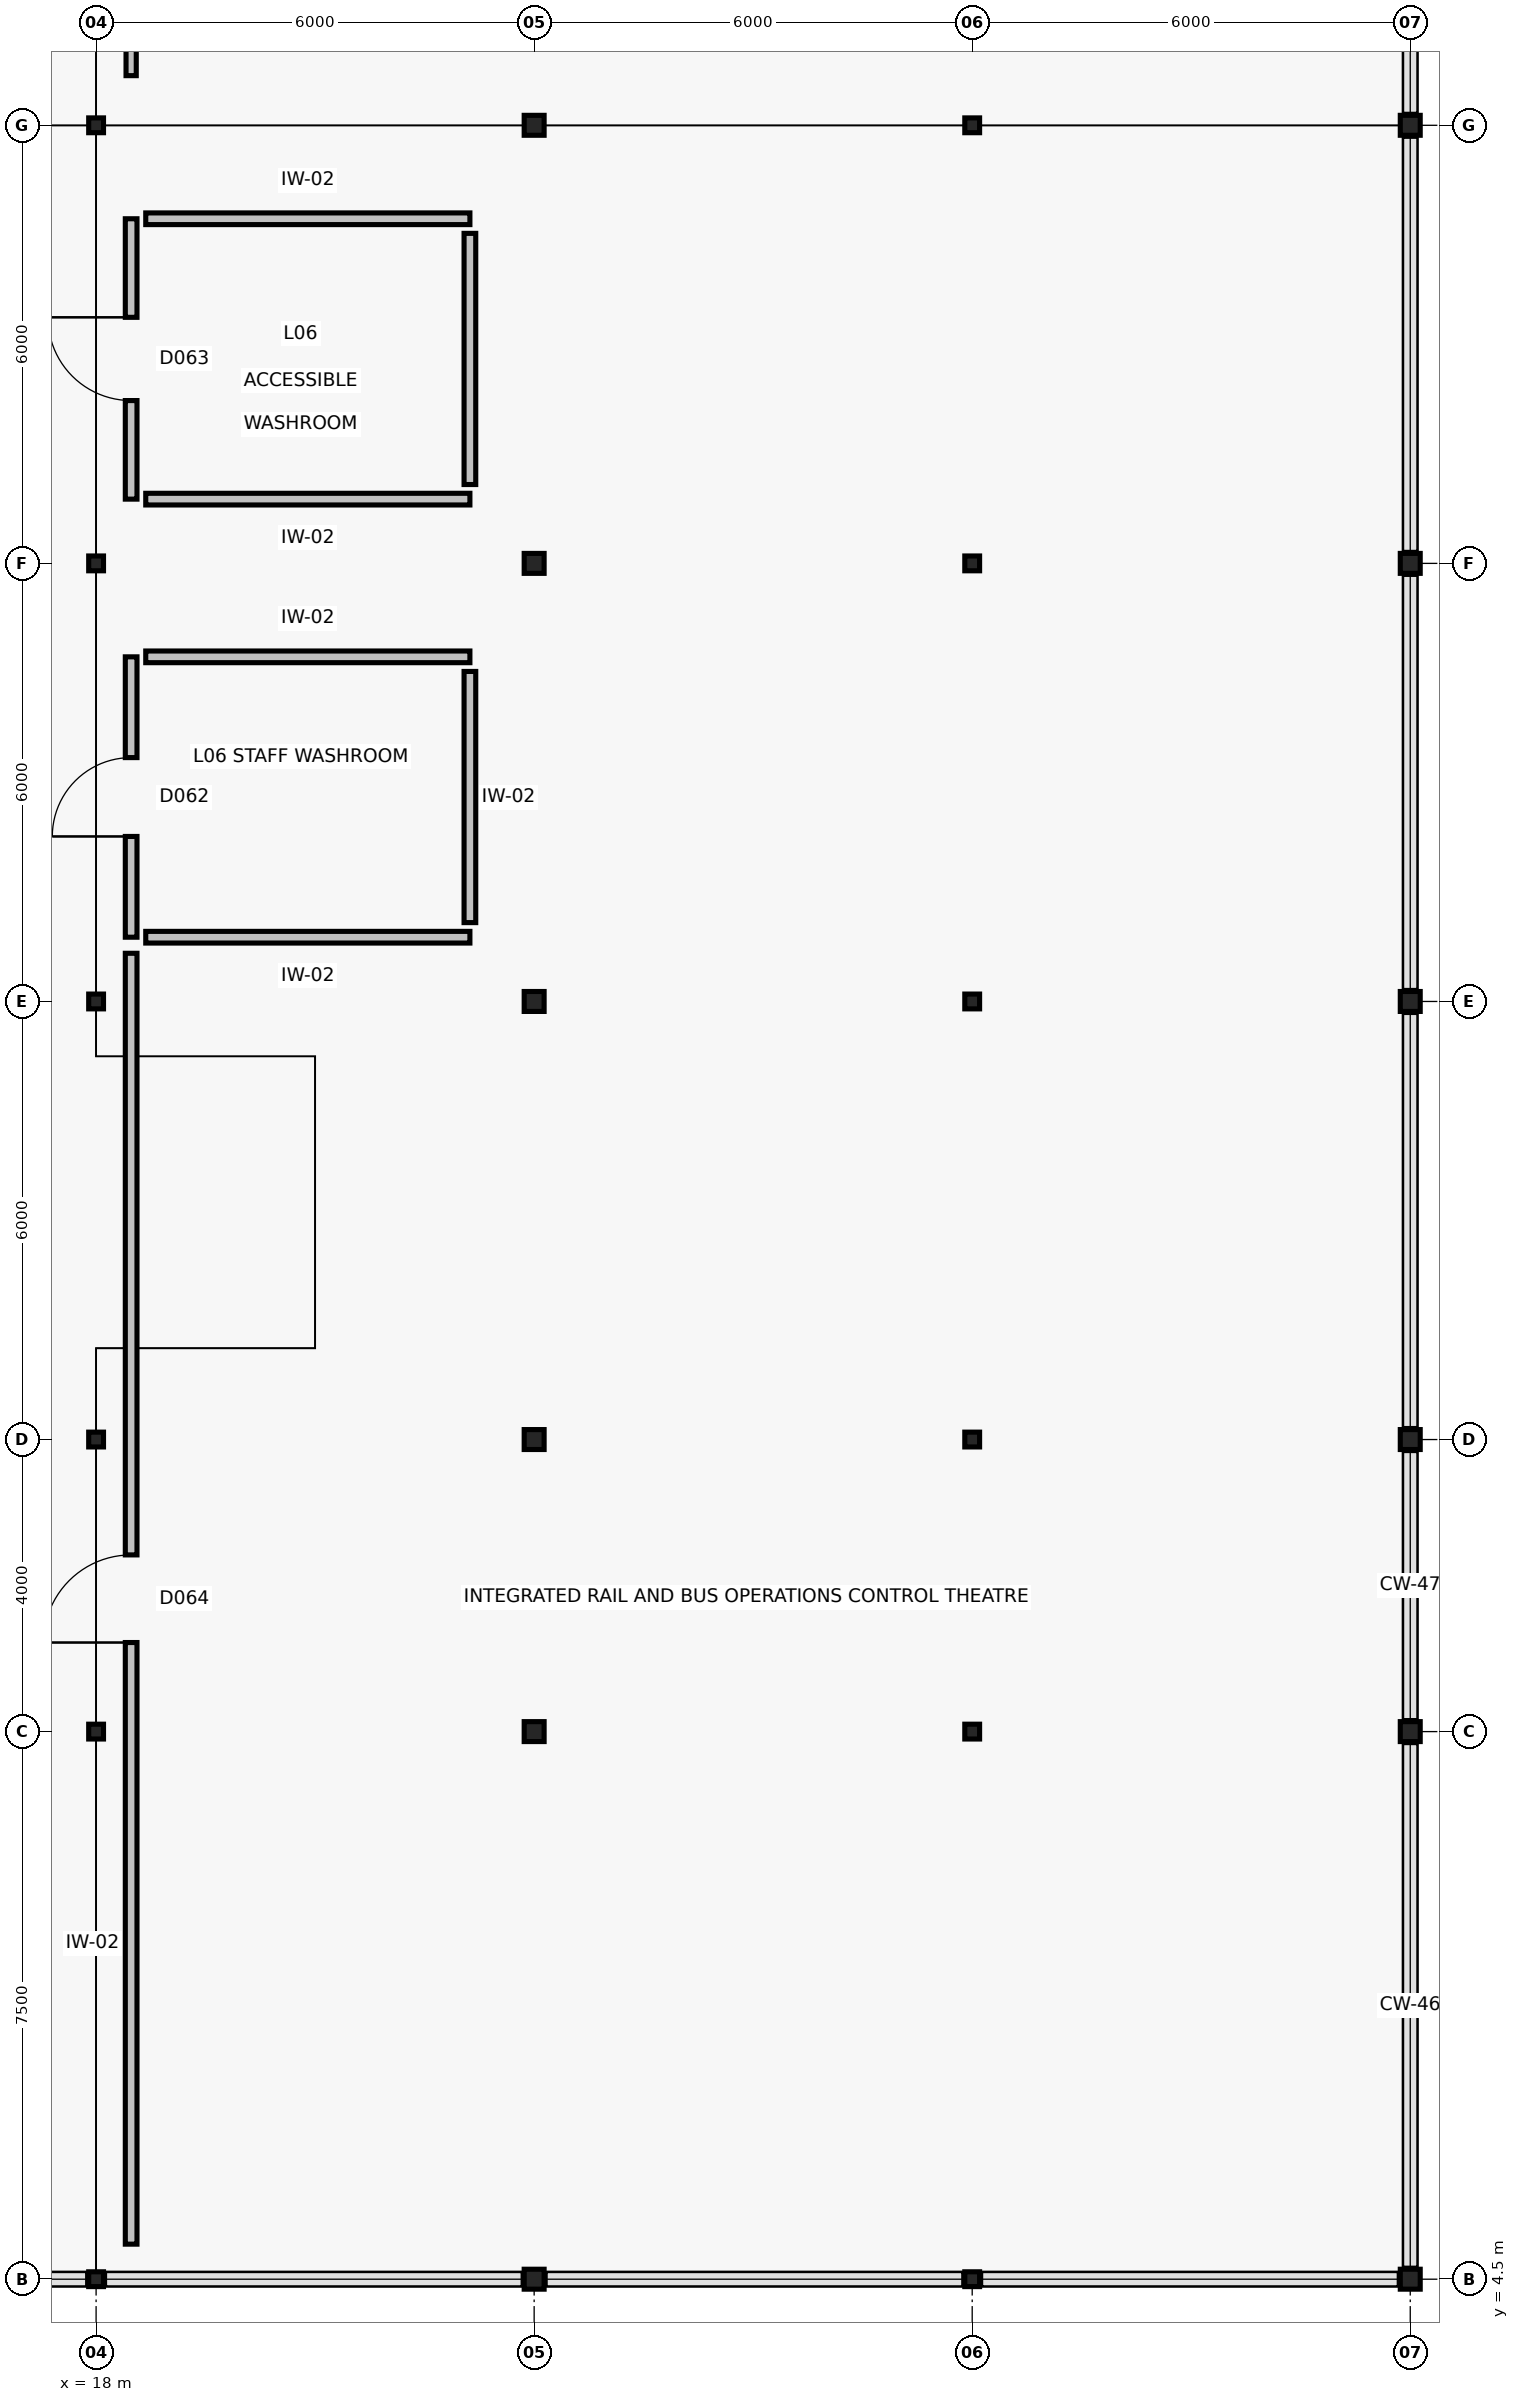
"""IFC4 building model, lengths in metres.
Left out: names, types, materials, properties, quantities, classifications, styles, units other than length and angle.
Written with IfcOpenShell. Run it as: python <this file> out.ifc"""

import sys

from ifc_helpers import new_model, si_unit, direction, frame, frame_2d, origin, origin_2d, place, context, subcontext, project, spatial, rectangle, hollow_rectangle, hollow_circle, extrude, element, fill, save


model = new_model("IFC4")
c1 = context("Model", 3, precision=1e-05, world=origin(), true_north=direction((0.0, 1.0)))
c2 = subcontext(c1, "Body", "Model", "MODEL_VIEW")
j1 = project(units=[si_unit("LENGTHUNIT", "METRE"), si_unit("PLANEANGLEUNIT", "RADIAN")], contexts=[c1])
p1 = place(None, origin())
s1 = spatial("IfcSite", under=j1, at=p1, CompositionType="ELEMENT")
p2 = place(p1, origin())
s2 = spatial("IfcBuilding", under=s1, at=p2, CompositionType="ELEMENT")
p3 = place(p2, frame((0.0, 0.0, 23.6)))
s3 = spatial("IfcBuildingStorey", under=s2, at=p3, CompositionType="ELEMENT", Elevation=23.6)
for number, where, z_axis, x_axis in (
    (1, (18.0, 4.5, 0.0), (0.0, 0.0, 1.0), (1.0, 0.0, 0.0)),
    (2, (18.0, 12.0, 0.0), (0.0, 0.0, 1.0), (1.0, 0.0, 0.0)),
    (3, (18.0, 16.0, 0.0), (0.0, 0.0, 1.0), (1.0, 0.0, 0.0)),
    (4, (18.0, 22.0, 0.0), (0.0, 0.0, 1.0), (1.0, 0.0, 0.0)),
    (5, (18.0, 28.0, 0.0), (0.0, 0.0, 1.0), (1.0, 0.0, 0.0)),
    (6, (18.0, 34.0, 0.0), (0.0, 0.0, 1.0), (1.0, 0.0, 0.0)),
):
    element("IfcColumn", number, at=place(p3, frame(where, z_axis=z_axis, x_axis=x_axis)), inside=s3, PredefinedType="COLUMN", context=c2, shape_type="SweptSolid", body=[
        extrude(hollow_rectangle(XDim=0.203, YDim=0.203, WallThickness=0.01, InnerFilletRadius=0.01, OuterFilletRadius=0.019, at=origin_2d()), origin(), (0.0, 0.0, 1.0), 5.0),
    ])
for number, where, z_axis, x_axis in (
    (7, (24.0, 4.5, 0.0), (0.0, 0.0, 1.0), (1.0, 0.0, 0.0)),
    (8, (24.0, 12.0, 0.0), (0.0, 0.0, 1.0), (1.0, 0.0, 0.0)),
    (9, (24.0, 16.0, 0.0), (0.0, 0.0, 1.0), (1.0, 0.0, 0.0)),
    (10, (24.0, 22.0, 0.0), (0.0, 0.0, 1.0), (1.0, 0.0, 0.0)),
    (11, (24.0, 28.0, 0.0), (0.0, 0.0, 1.0), (1.0, 0.0, 0.0)),
    (12, (24.0, 34.0, 0.0), (0.0, 0.0, 1.0), (1.0, 0.0, 0.0)),
):
    element("IfcColumn", number, at=place(p3, frame(where, z_axis=z_axis, x_axis=x_axis)), inside=s3, PredefinedType="COLUMN", context=c2, shape_type="SweptSolid", body=[
        extrude(hollow_circle(Radius=0.136, WallThickness=0.01, at=origin_2d()), origin(), (0.0, 0.0, 1.0), 5.0),
    ])
for number, where, z_axis, x_axis in (
    (13, (30.0, 4.5, 0.0), (0.0, 0.0, 1.0), (1.0, 0.0, 0.0)),
    (14, (30.0, 12.0, 0.0), (0.0, 0.0, 1.0), (1.0, 0.0, 0.0)),
    (15, (30.0, 16.0, 0.0), (0.0, 0.0, 1.0), (1.0, 0.0, 0.0)),
    (16, (30.0, 22.0, 0.0), (0.0, 0.0, 1.0), (1.0, 0.0, 0.0)),
    (17, (30.0, 28.0, 0.0), (0.0, 0.0, 1.0), (1.0, 0.0, 0.0)),
    (18, (30.0, 34.0, 0.0), (0.0, 0.0, 1.0), (1.0, 0.0, 0.0)),
):
    element("IfcColumn", number, at=place(p3, frame(where, z_axis=z_axis, x_axis=x_axis)), inside=s3, PredefinedType="COLUMN", context=c2, shape_type="SweptSolid", body=[
        extrude(hollow_rectangle(XDim=0.203, YDim=0.203, WallThickness=0.01, InnerFilletRadius=0.01, OuterFilletRadius=0.019, at=origin_2d()), origin(), (0.0, 0.0, 1.0), 5.0),
    ])
for number, where, z_axis, x_axis in (
    (19, (36.0, 4.5, 0.0), (0.0, 0.0, 1.0), (1.0, 0.0, 0.0)),
    (20, (36.0, 12.0, 0.0), (0.0, 0.0, 1.0), (1.0, 0.0, 0.0)),
    (21, (36.0, 16.0, 0.0), (0.0, 0.0, 1.0), (1.0, 0.0, 0.0)),
    (22, (36.0, 22.0, 0.0), (0.0, 0.0, 1.0), (1.0, 0.0, 0.0)),
    (23, (36.0, 28.0, 0.0), (0.0, 0.0, 1.0), (1.0, 0.0, 0.0)),
    (24, (36.0, 34.0, 0.0), (0.0, 0.0, 1.0), (1.0, 0.0, 0.0)),
):
    element("IfcColumn", number, at=place(p3, frame(where, z_axis=z_axis, x_axis=x_axis)), inside=s3, PredefinedType="COLUMN", context=c2, shape_type="SweptSolid", body=[
        extrude(hollow_circle(Radius=0.136, WallThickness=0.01, at=origin_2d()), origin(), (0.0, 0.0, 1.0), 5.0),
    ])
p4 = place(p3, frame((18.48, 22.88, 0.0), z_axis=(0.0, 0.0, 1.0), x_axis=(0.0, 1.0, 0.0)))
e25 = element("IfcWall", 25, at=p4, inside=s3, PredefinedType="PARTITIONING", context=c2, shape_type="SweptSolid", body=[
    extrude(rectangle(XDim=3.84, YDim=0.16, at=frame_2d((1.92, 0.0))), origin(), (0.0, 0.0, 1.0), 4.75),
])
p5 = place(p4, frame((1.38, 0.0, 0.0)))
e26 = element("IfcOpeningElement", 26, at=p5, cuts=e25, PredefinedType="OPENING", context=c2, shape_type="SweptSolid", body=[
    extrude(rectangle(XDim=1.08, YDim=2.15, at=frame_2d((0.54, 1.075))), frame((0.0, 0.095, 0.0), z_axis=(0.0, -1.0, 0.0), x_axis=(1.0, 0.0, 0.0)), (0.0, 0.0, 1.0), 0.19),
])
for number, where, z_axis, x_axis in (
    (27, (18.68, 26.72, 0.0), (0.0, 0.0, 1.0), (1.0, 0.0, 0.0)),
    (28, (23.12, 22.88, 0.0), (0.0, 0.0, 1.0), (-1.0, 0.0, 0.0)),
):
    element("IfcWall", number, at=place(p3, frame(where, z_axis=z_axis, x_axis=x_axis)), inside=s3, PredefinedType="PARTITIONING", context=c2, shape_type="SweptSolid", body=[
        extrude(rectangle(XDim=4.44, YDim=0.16, at=frame_2d((2.22, 0.0))), origin(), (0.0, 0.0, 1.0), 4.414),
    ])
p6 = place(p3, frame((23.12, 26.52, 0.0), z_axis=(0.0, 0.0, 1.0), x_axis=(0.0, -1.0, 0.0)))
e29 = element("IfcWall", 29, at=p6, inside=s3, PredefinedType="PARTITIONING", context=c2, shape_type="SweptSolid", body=[
    extrude(rectangle(XDim=3.44, YDim=0.16, at=frame_2d((1.72, 0.0))), origin(), (0.0, 0.0, 1.0), 4.75),
])
p7 = place(p3, frame((18.48, 28.88, 0.0), z_axis=(0.0, 0.0, 1.0), x_axis=(0.0, 1.0, 0.0)))
e30 = element("IfcWall", 30, at=p7, inside=s3, PredefinedType="PARTITIONING", context=c2, shape_type="SweptSolid", body=[
    extrude(rectangle(XDim=3.84, YDim=0.16, at=frame_2d((1.92, 0.0))), origin(), (0.0, 0.0, 1.0), 4.75),
])
p8 = place(p7, frame((1.35, 0.0, 0.0)))
e31 = element("IfcOpeningElement", 31, at=p8, cuts=e30, PredefinedType="OPENING", context=c2, shape_type="SweptSolid", body=[
    extrude(rectangle(XDim=1.14, YDim=2.15, at=frame_2d((0.57, 1.075))), frame((0.0, 0.095, 0.0), z_axis=(0.0, -1.0, 0.0), x_axis=(1.0, 0.0, 0.0)), (0.0, 0.0, 1.0), 0.19),
])
for number, where, z_axis, x_axis in (
    (32, (18.68, 32.72, 0.0), (0.0, 0.0, 1.0), (1.0, 0.0, 0.0)),
    (33, (23.12, 28.88, 0.0), (0.0, 0.0, 1.0), (-1.0, 0.0, 0.0)),
):
    element("IfcWall", number, at=place(p3, frame(where, z_axis=z_axis, x_axis=x_axis)), inside=s3, PredefinedType="PARTITIONING", context=c2, shape_type="SweptSolid", body=[
        extrude(rectangle(XDim=4.44, YDim=0.16, at=frame_2d((2.22, 0.0))), origin(), (0.0, 0.0, 1.0), 4.406),
    ])
p9 = place(p3, frame((23.12, 32.52, 0.0), z_axis=(0.0, 0.0, 1.0), x_axis=(0.0, -1.0, 0.0)))
e34 = element("IfcWall", 34, at=p9, inside=s3, PredefinedType="PARTITIONING", context=c2, shape_type="SweptSolid", body=[
    extrude(rectangle(XDim=3.44, YDim=0.16, at=frame_2d((1.72, 0.0))), origin(), (0.0, 0.0, 1.0), 4.75),
])
p10 = place(p3, frame((18.48, 4.98, 0.0), z_axis=(0.0, 0.0, 1.0), x_axis=(0.0, 1.0, 0.0)))
e35 = element("IfcWall", 35, at=p10, inside=s3, PredefinedType="PARTITIONING", context=c2, shape_type="SweptSolid", body=[
    extrude(rectangle(XDim=17.68, YDim=0.16, at=frame_2d((8.84, 0.0))), origin(), (0.0, 0.0, 1.0), 4.31),
])
p11 = place(p10, frame((8.24, 0.0, 0.0)))
e36 = element("IfcOpeningElement", 36, at=p11, cuts=e35, PredefinedType="OPENING", context=c2, shape_type="SweptSolid", body=[
    extrude(rectangle(XDim=1.2, YDim=2.15, at=frame_2d((0.6, 1.075))), frame((0.0, 0.095, 0.0), z_axis=(0.0, -1.0, 0.0), x_axis=(1.0, 0.0, 0.0)), (0.0, 0.0, 1.0), 0.19),
])
p12 = place(p3, frame((18.48, 34.68, 0.0), z_axis=(0.0, 0.0, 1.0), x_axis=(0.0, 1.0, 0.0)))
e37 = element("IfcWall", 37, at=p12, inside=s3, PredefinedType="PARTITIONING", context=c2, shape_type="SweptSolid", body=[
    extrude(rectangle(XDim=13.24, YDim=0.14, at=frame_2d((6.62, 0.0))), origin(), (0.0, 0.0, 1.0), 4.181),
])
p13 = place(p12, frame((2.631, 0.0, 0.0)))
e38 = element("IfcOpeningElement", 38, at=p13, cuts=e37, PredefinedType="OPENING", context=c2, shape_type="SweptSolid", body=[
    extrude(rectangle(XDim=1.28, YDim=2.2, at=frame_2d((0.64, 1.1))), frame((0.0, 0.085, 0.0), z_axis=(0.0, -1.0, 0.0), x_axis=(1.0, 0.0, 0.0)), (0.0, 0.0, 1.0), 0.17),
])
p14 = place(p5, origin())
e39 = element("IfcDoor", 39, at=p14, inside=s3, OperationType="SINGLE_SWING_LEFT", PredefinedType="DOOR", context=c2, shape_type="SweptSolid", body=[
    extrude(rectangle(XDim=1.08, YDim=2.15, at=frame_2d((0.54, 1.075))), frame((0.0, 0.025, 0.0), z_axis=(0.0, -1.0, 0.0), x_axis=(1.0, 0.0, 0.0)), (0.0, 0.0, 1.0), 0.05),
])
fill(e26, e39)
p15 = place(p8, origin())
e40 = element("IfcDoor", 40, at=p15, inside=s3, OperationType="SINGLE_SWING_RIGHT", PredefinedType="DOOR", context=c2, shape_type="SweptSolid", body=[
    extrude(rectangle(XDim=1.14, YDim=2.15, at=frame_2d((0.57, 1.075))), frame((0.0, 0.025, 0.0), z_axis=(0.0, -1.0, 0.0), x_axis=(1.0, 0.0, 0.0)), (0.0, 0.0, 1.0), 0.05),
])
fill(e31, e40)
p16 = place(p11, origin())
e41 = element("IfcDoor", 41, at=p16, inside=s3, OperationType="SINGLE_SWING_LEFT", PredefinedType="DOOR", context=c2, shape_type="SweptSolid", body=[
    extrude(rectangle(XDim=1.2, YDim=2.15, at=frame_2d((0.6, 1.075))), frame((0.0, 0.025, 0.0), z_axis=(0.0, -1.0, 0.0), x_axis=(1.0, 0.0, 0.0)), (0.0, 0.0, 1.0), 0.05),
])
fill(e36, e41)
save(model, sys.argv[1])
